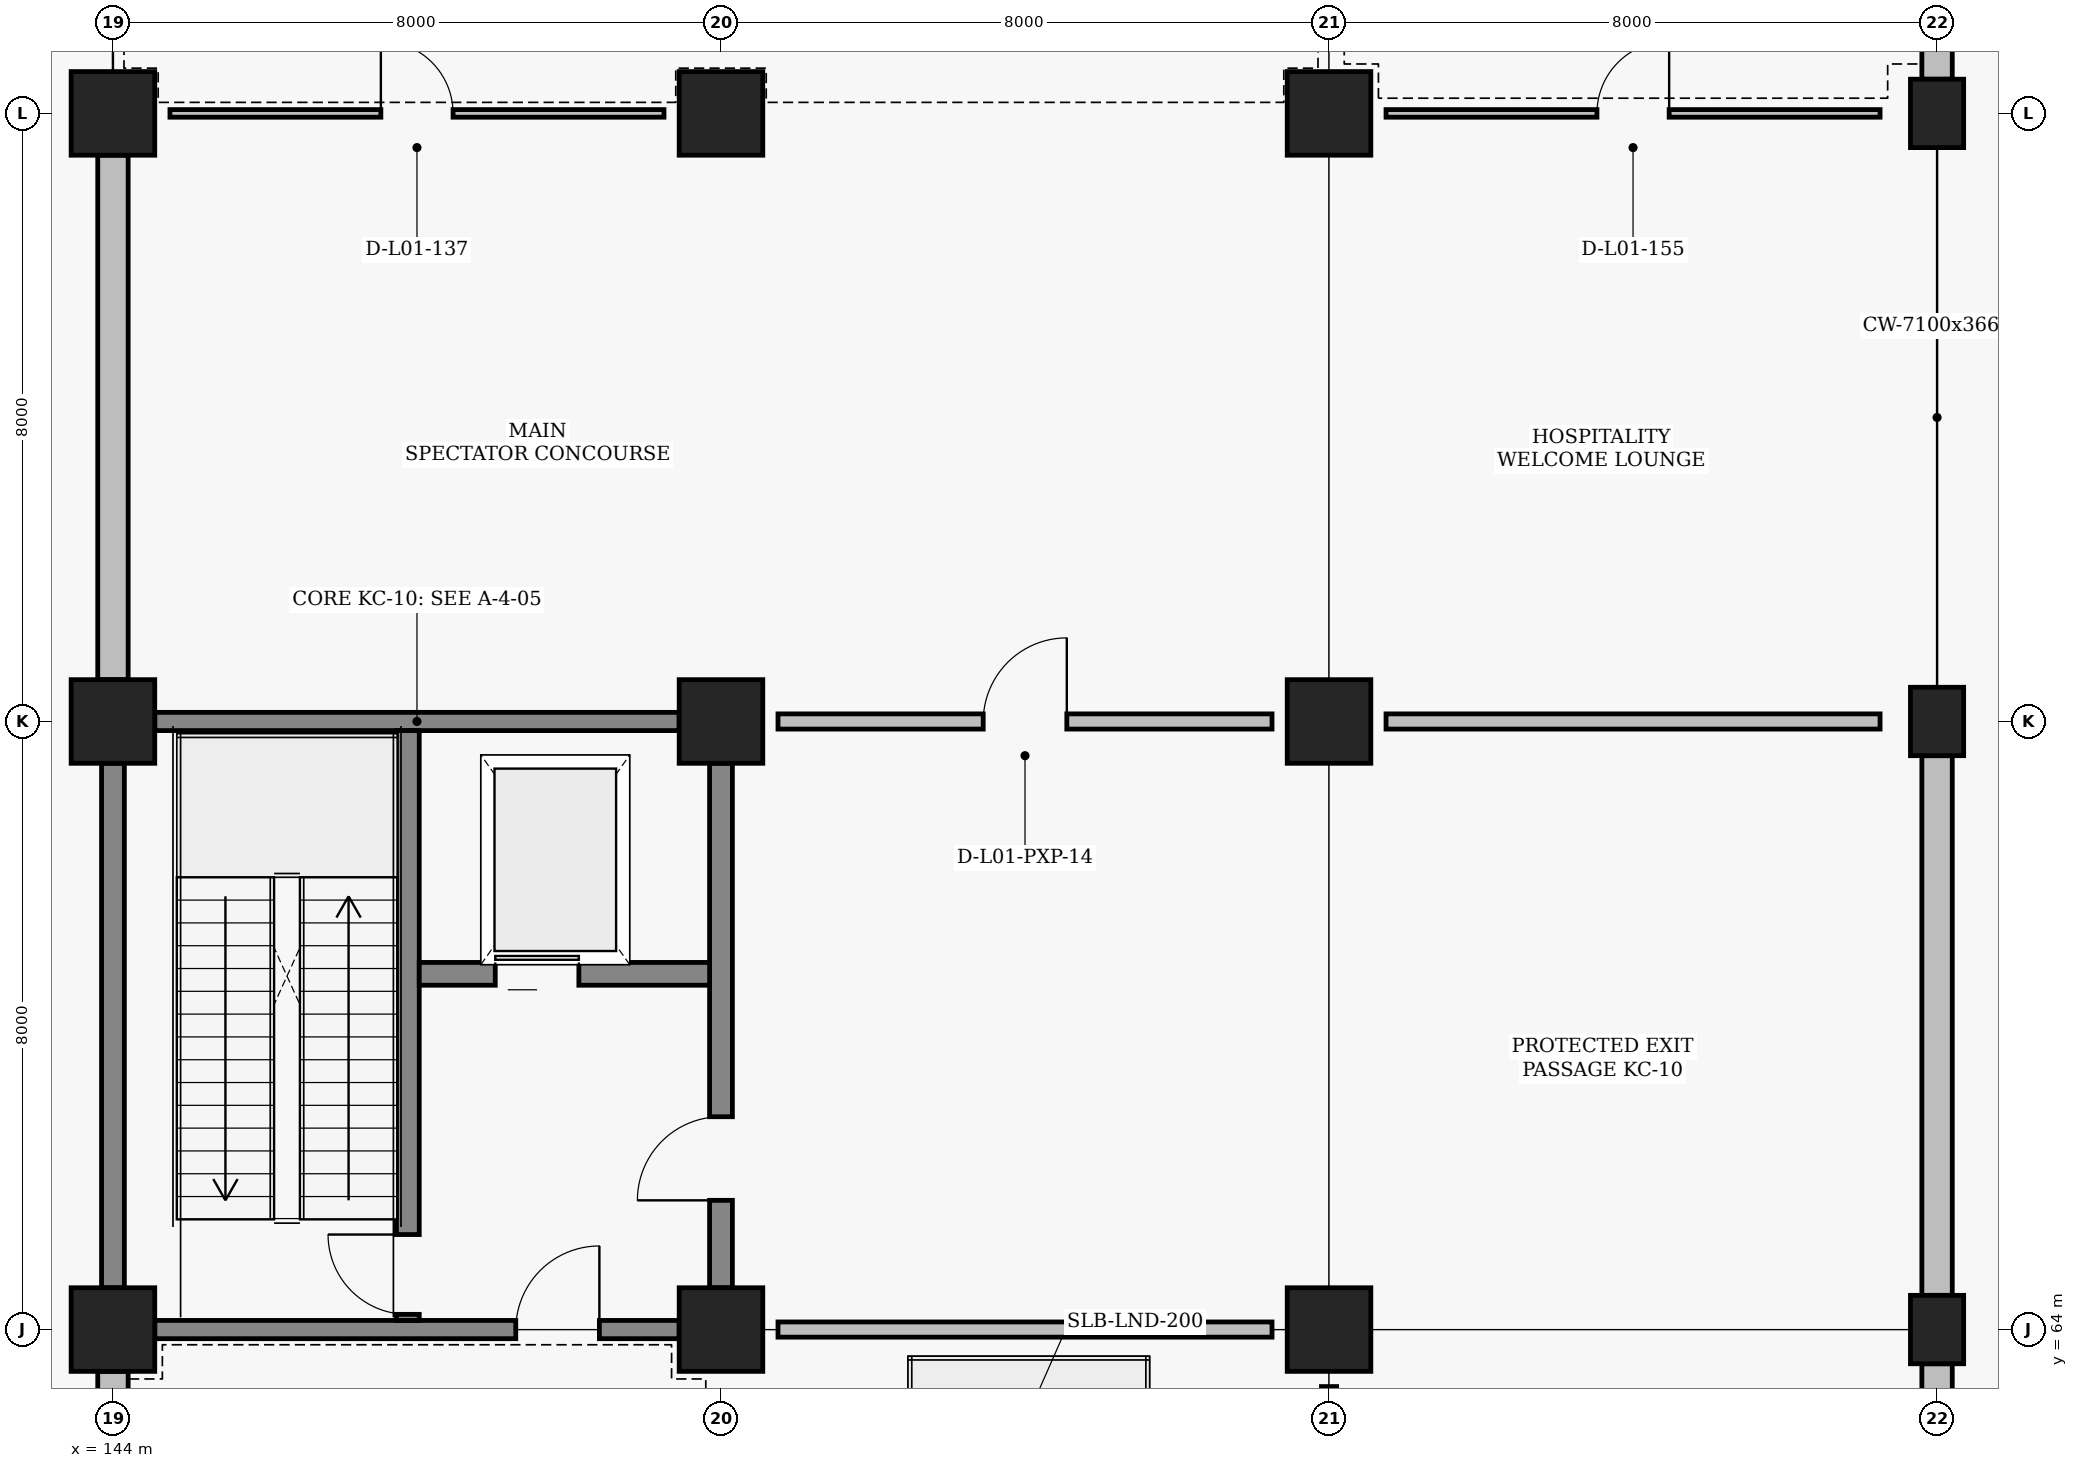
"""IFC4 building model, lengths in metres.
Left out: names, types, materials, properties, quantities, classifications, styles, units other than length and angle.
Written with IfcOpenShell. Run it as: python <this file> out.ifc"""

import sys

from ifc_helpers import new_model, si_unit, direction, frame, frame_2d, origin, origin_2d, place, context, subcontext, project, spatial, rectangle, extrude, element, fill, save


model = new_model("IFC4")
c1 = context("Model", 3, precision=1e-05, world=origin(), true_north=direction((0.0, 1.0)))
c2 = subcontext(c1, "Body", "Model", "MODEL_VIEW")
j1 = project(units=[si_unit("LENGTHUNIT", "METRE"), si_unit("PLANEANGLEUNIT", "RADIAN")], contexts=[c1])
p1 = place(None, origin())
s1 = spatial("IfcSite", under=j1, at=p1, CompositionType="ELEMENT")
p2 = place(p1, origin())
s2 = spatial("IfcBuilding", under=s1, at=p2, CompositionType="ELEMENT")
p3 = place(p2, origin())
s3 = spatial("IfcBuildingStorey", under=s2, at=p3, CompositionType="ELEMENT", Elevation=0.0)
for number, where, z_axis, x_axis in (
    (1, (144.0, 64.0, 0.0), (0.0, 0.0, 1.0), (1.0, 0.0, 0.0)),
    (2, (144.0, 72.0, 0.0), (0.0, 0.0, 1.0), (1.0, 0.0, 0.0)),
    (3, (144.0, 80.0, 0.0), (0.0, 0.0, 1.0), (1.0, 0.0, 0.0)),
    (4, (152.0, 64.0, 0.0), (0.0, 0.0, 1.0), (1.0, 0.0, 0.0)),
    (5, (152.0, 72.0, 0.0), (0.0, 0.0, 1.0), (1.0, 0.0, 0.0)),
    (6, (152.0, 80.0, 0.0), (0.0, 0.0, 1.0), (1.0, 0.0, 0.0)),
    (7, (160.0, 64.0, 0.0), (0.0, 0.0, 1.0), (1.0, 0.0, 0.0)),
    (8, (160.0, 72.0, 0.0), (0.0, 0.0, 1.0), (1.0, 0.0, 0.0)),
    (9, (160.0, 80.0, 0.0), (0.0, 0.0, 1.0), (1.0, 0.0, 0.0)),
):
    element("IfcColumn", number, at=place(p3, frame(where, z_axis=z_axis, x_axis=x_axis)), inside=s3, PredefinedType="COLUMN", context=c2, shape_type="SweptSolid", body=[
        extrude(rectangle(XDim=1.1, YDim=1.1, at=origin_2d()), origin(), (0.0, 0.0, 1.0), 4.8),
    ])
for number, where, z_axis, x_axis in (
    (10, (168.0, 64.0, 0.0), (0.0, 0.0, 1.0), (1.0, 0.0, 0.0)),
    (11, (168.0, 72.0, 0.0), (0.0, 0.0, 1.0), (1.0, 0.0, 0.0)),
    (12, (168.0, 80.0, 0.0), (0.0, 0.0, 1.0), (1.0, 0.0, 0.0)),
):
    element("IfcColumn", number, at=place(p3, frame(where, z_axis=z_axis, x_axis=x_axis)), inside=s3, PredefinedType="COLUMN", context=c2, shape_type="SweptSolid", body=[
        extrude(rectangle(XDim=0.7, YDim=0.9, at=origin_2d()), origin(), (0.0, 0.0, 1.0), 4.8),
    ])
p4 = place(p3, frame((144.0, 56.55, 0.0), z_axis=(0.0, 0.0, 1.0), x_axis=(0.0, 1.0, 0.0)))
e13 = element("IfcWall", 13, at=p4, inside=s3, PredefinedType="SOLIDWALL", context=c2, shape_type="SweptSolid", body=[
    extrude(rectangle(XDim=6.9, YDim=0.4, at=frame_2d((3.45, 0.0))), origin(), (0.0, 0.0, 1.0), 3.66),
])
p5 = place(p3, frame((144.0, 72.55, 0.0), z_axis=(0.0, 0.0, 1.0), x_axis=(0.0, 1.0, 0.0)))
e14 = element("IfcWall", 14, at=p5, inside=s3, PredefinedType="SOLIDWALL", context=c2, shape_type="SweptSolid", body=[
    extrude(rectangle(XDim=6.9, YDim=0.4, at=frame_2d((3.45, 0.0))), origin(), (0.0, 0.0, 1.0), 3.91),
])
p6 = place(p3, frame((168.0, 56.45, 0.0), z_axis=(0.0, 0.0, 1.0), x_axis=(0.0, 1.0, 0.0)))
e15 = element("IfcWall", 15, at=p6, inside=s3, PredefinedType="SOLIDWALL", context=c2, shape_type="SweptSolid", body=[
    extrude(rectangle(XDim=7.1, YDim=0.4, at=frame_2d((3.55, 0.0))), origin(), (0.0, 0.0, 1.0), 3.91),
])
p7 = place(p6, frame((1.825, 0.0, 0.95)))
e16 = element("IfcOpeningElement", 16, at=p7, cuts=e15, PredefinedType="OPENING", context=c2, shape_type="SweptSolid", body=[
    extrude(rectangle(XDim=3.45, YDim=2.2, at=frame_2d((1.725, 1.1))), frame((0.0, 0.21, 0.0), z_axis=(0.0, -1.0, 0.0), x_axis=(1.0, 0.0, 0.0)), (0.0, 0.0, 1.0), 0.42),
])
p8 = place(p3, frame((168.0, 64.45, 0.0), z_axis=(0.0, 0.0, 1.0), x_axis=(0.0, 1.0, 0.0)))
e17 = element("IfcWall", 17, at=p8, inside=s3, PredefinedType="SOLIDWALL", context=c2, shape_type="SweptSolid", body=[
    extrude(rectangle(XDim=7.1, YDim=0.4, at=frame_2d((3.55, 0.0))), origin(), (0.0, 0.0, 1.0), 3.91),
])
p9 = place(p3, frame((168.0, 80.45, 0.0), z_axis=(0.0, 0.0, 1.0), x_axis=(0.0, 1.0, 0.0)))
e18 = element("IfcWall", 18, at=p9, inside=s3, PredefinedType="SOLIDWALL", context=c2, shape_type="SweptSolid", body=[
    extrude(rectangle(XDim=7.1, YDim=0.4, at=frame_2d((3.55, 0.0))), origin(), (0.0, 0.0, 1.0), 3.66),
])
p10 = place(p3, frame((144.55, 64.0, 0.0), z_axis=(0.0, 0.0, 1.0), x_axis=(1.0, 0.0, 0.0)))
e19 = element("IfcWall", 19, at=p10, inside=s3, PredefinedType="SHEAR", context=c2, shape_type="SweptSolid", body=[
    extrude(rectangle(XDim=6.9, YDim=0.24, at=frame_2d((3.45, 0.0))), origin(), (0.0, 0.0, 1.0), 3.81),
])
p11 = place(p10, frame((4.75, 0.0, 0.0)))
e20 = element("IfcOpeningElement", 20, at=p11, cuts=e19, PredefinedType="OPENING", context=c2, shape_type="SweptSolid", body=[
    extrude(rectangle(XDim=1.1, YDim=2.2, at=frame_2d((0.55, 1.1))), frame((0.0, 0.13, 0.0), z_axis=(0.0, -1.0, 0.0), x_axis=(1.0, 0.0, 0.0)), (0.0, 0.0, 1.0), 0.26),
])
p12 = place(p3, frame((144.55, 72.0, 0.0), z_axis=(0.0, 0.0, 1.0), x_axis=(1.0, 0.0, 0.0)))
e21 = element("IfcWall", 21, at=p12, inside=s3, PredefinedType="SHEAR", context=c2, shape_type="SweptSolid", body=[
    extrude(rectangle(XDim=6.9, YDim=0.24, at=frame_2d((3.45, 0.0))), origin(), (0.0, 0.0, 1.0), 3.81),
])
p13 = place(p3, frame((144.0, 64.55, 0.0), z_axis=(0.0, 0.0, 1.0), x_axis=(0.0, 1.0, 0.0)))
e22 = element("IfcWall", 22, at=p13, inside=s3, PredefinedType="SHEAR", context=c2, shape_type="SweptSolid", body=[
    extrude(rectangle(XDim=6.9, YDim=0.3, at=frame_2d((3.45, 0.0))), origin(), (0.0, 0.0, 1.0), 3.91),
])
p14 = place(p3, frame((152.0, 64.55, 0.0), z_axis=(0.0, 0.0, 1.0), x_axis=(0.0, 1.0, 0.0)))
e23 = element("IfcWall", 23, at=p14, inside=s3, PredefinedType="SHEAR", context=c2, shape_type="SweptSolid", body=[
    extrude(rectangle(XDim=6.9, YDim=0.3, at=frame_2d((3.45, 0.0))), origin(), (0.0, 0.0, 1.0), 3.81),
])
p15 = place(p14, frame((1.15, 0.0, 0.0)))
e24 = element("IfcOpeningElement", 24, at=p15, cuts=e23, PredefinedType="OPENING", context=c2, shape_type="SweptSolid", body=[
    extrude(rectangle(XDim=1.1, YDim=2.2, at=frame_2d((0.55, 1.1))), frame((0.0, 0.16, 0.0), z_axis=(0.0, -1.0, 0.0), x_axis=(1.0, 0.0, 0.0)), (0.0, 0.0, 1.0), 0.32),
])
p16 = place(p3, frame((147.88, 64.12, 0.0), z_axis=(0.0, 0.0, 1.0), x_axis=(0.0, 1.0, 0.0)))
e25 = element("IfcWall", 25, at=p16, inside=s3, PredefinedType="SHEAR", context=c2, shape_type="SweptSolid", body=[
    extrude(rectangle(XDim=7.76, YDim=0.3, at=frame_2d((3.88, 0.0))), origin(), (0.0, 0.0, 1.0), 4.01),
])
p17 = place(p16, frame((0.08, 0.0, 0.0)))
e26 = element("IfcOpeningElement", 26, at=p17, cuts=e25, PredefinedType="OPENING", context=c2, shape_type="SweptSolid", body=[
    extrude(rectangle(XDim=1.05, YDim=2.15, at=frame_2d((0.525, 1.075))), frame((0.0, 0.16, 0.0), z_axis=(0.0, -1.0, 0.0), x_axis=(1.0, 0.0, 0.0)), (0.0, 0.0, 1.0), 0.32),
])
p18 = place(p3, frame((148.03, 68.68, 0.0), z_axis=(0.0, 0.0, 1.0), x_axis=(1.0, 0.0, 0.0)))
e27 = element("IfcWall", 27, at=p18, inside=s3, PredefinedType="SHEAR", context=c2, shape_type="SweptSolid", body=[
    extrude(rectangle(XDim=3.82, YDim=0.3, at=frame_2d((1.91, 0.0))), origin(), (0.0, 0.0, 1.0), 3.81),
])
p19 = place(p18, frame((1.0, 0.0, 0.0)))
e28 = element("IfcOpeningElement", 28, at=p19, cuts=e27, PredefinedType="OPENING", context=c2, shape_type="SweptSolid", body=[
    extrude(rectangle(XDim=1.1, YDim=2.15, at=frame_2d((0.55, 1.075))), frame((0.0, 0.16, 0.0), z_axis=(0.0, -1.0, 0.0), x_axis=(1.0, 0.0, 0.0)), (0.0, 0.0, 1.0), 0.32),
])
p20 = place(p3, frame((152.75, 64.0, 0.0), z_axis=(0.0, 0.0, 1.0), x_axis=(1.0, 0.0, 0.0)))
e29 = element("IfcWall", 29, at=p20, inside=s3, PredefinedType="PARTITIONING", context=c2, shape_type="SweptSolid", body=[
    extrude(rectangle(XDim=6.5, YDim=0.2, at=frame_2d((3.25, 0.0))), origin(), (0.0, 0.0, 1.0), 3.91),
])
p21 = place(p3, frame((152.75, 72.0, 0.0), z_axis=(0.0, 0.0, 1.0), x_axis=(1.0, 0.0, 0.0)))
e30 = element("IfcWall", 30, at=p21, inside=s3, PredefinedType="PARTITIONING", context=c2, shape_type="SweptSolid", body=[
    extrude(rectangle(XDim=6.5, YDim=0.2, at=frame_2d((3.25, 0.0))), origin(), (0.0, 0.0, 1.0), 3.91),
])
p22 = place(p21, frame((2.7, 0.0, 0.0)))
e31 = element("IfcOpeningElement", 31, at=p22, cuts=e30, PredefinedType="OPENING", context=c2, shape_type="SweptSolid", body=[
    extrude(rectangle(XDim=1.1, YDim=2.2, at=frame_2d((0.55, 1.1))), frame((0.0, 0.11, 0.0), z_axis=(0.0, -1.0, 0.0), x_axis=(1.0, 0.0, 0.0)), (0.0, 0.0, 1.0), 0.22),
])
p23 = place(p3, frame((160.0, 56.75, 0.0), z_axis=(0.0, 0.0, 1.0), x_axis=(0.0, 1.0, 0.0)))
e32 = element("IfcWall", 32, at=p23, inside=s3, PredefinedType="PARTITIONING", context=c2, shape_type="SweptSolid", body=[
    extrude(rectangle(XDim=6.5, YDim=0.2, at=frame_2d((3.25, 0.0))), origin(), (0.0, 0.0, 1.0), 3.81),
])
p24 = place(p3, frame((160.75, 72.0, 0.0), z_axis=(0.0, 0.0, 1.0), x_axis=(1.0, 0.0, 0.0)))
e33 = element("IfcWall", 33, at=p24, inside=s3, PredefinedType="PARTITIONING", context=c2, shape_type="SweptSolid", body=[
    extrude(rectangle(XDim=6.5, YDim=0.2, at=frame_2d((3.25, 0.0))), origin(), (0.0, 0.0, 1.0), 3.91),
])
p25 = place(p3, frame((144.75, 80.0, 0.0), z_axis=(0.0, 0.0, 1.0), x_axis=(1.0, 0.0, 0.0)))
e34 = element("IfcWall", 34, at=p25, inside=s3, PredefinedType="PARTITIONING", context=c2, shape_type="SweptSolid", body=[
    extrude(rectangle(XDim=6.5, YDim=0.1, at=frame_2d((3.25, 0.0))), origin(), (0.0, 0.0, 1.0), 3.91),
])
p26 = place(p25, frame((2.775, 0.0, 0.0)))
e35 = element("IfcOpeningElement", 35, at=p26, cuts=e34, PredefinedType="OPENING", context=c2, shape_type="SweptSolid", body=[
    extrude(rectangle(XDim=0.95, YDim=2.1, at=frame_2d((0.475, 1.05))), frame((0.0, 0.06, 0.0), z_axis=(0.0, -1.0, 0.0), x_axis=(1.0, 0.0, 0.0)), (0.0, 0.0, 1.0), 0.12),
])
p27 = place(p3, frame((160.75, 80.0, 0.0), z_axis=(0.0, 0.0, 1.0), x_axis=(1.0, 0.0, 0.0)))
e36 = element("IfcWall", 36, at=p27, inside=s3, PredefinedType="PARTITIONING", context=c2, shape_type="SweptSolid", body=[
    extrude(rectangle(XDim=6.5, YDim=0.1, at=frame_2d((3.25, 0.0))), origin(), (0.0, 0.0, 1.0), 3.66),
])
p28 = place(p27, frame((2.775, 0.0, 0.0)))
e37 = element("IfcOpeningElement", 37, at=p28, cuts=e36, PredefinedType="OPENING", context=c2, shape_type="SweptSolid", body=[
    extrude(rectangle(XDim=0.95, YDim=2.1, at=frame_2d((0.475, 1.05))), frame((0.0, 0.06, 0.0), z_axis=(0.0, -1.0, 0.0), x_axis=(1.0, 0.0, 0.0)), (0.0, 0.0, 1.0), 0.12),
])
p29 = place(p11, origin())
e38 = element("IfcDoor", 38, at=p29, inside=s3, OperationType="SINGLE_SWING_RIGHT", PredefinedType="DOOR", context=c2, shape_type="SweptSolid", body=[
    extrude(rectangle(XDim=1.1, YDim=2.2, at=frame_2d((0.55, 1.1))), frame((0.0, 0.025, 0.0), z_axis=(0.0, -1.0, 0.0), x_axis=(1.0, 0.0, 0.0)), (0.0, 0.0, 1.0), 0.05),
])
fill(e20, e38)
p30 = place(p15, origin())
e39 = element("IfcDoor", 39, at=p30, inside=s3, OperationType="SINGLE_SWING_LEFT", PredefinedType="DOOR", context=c2, shape_type="SweptSolid", body=[
    extrude(rectangle(XDim=1.1, YDim=2.2, at=frame_2d((0.55, 1.1))), frame((0.0, 0.025, 0.0), z_axis=(0.0, -1.0, 0.0), x_axis=(1.0, 0.0, 0.0)), (0.0, 0.0, 1.0), 0.05),
])
fill(e24, e39)
p31 = place(p17, origin())
e40 = element("IfcDoor", 40, at=p31, inside=s3, OperationType="SINGLE_SWING_RIGHT", PredefinedType="DOOR", context=c2, shape_type="SweptSolid", body=[
    extrude(rectangle(XDim=1.05, YDim=2.15, at=frame_2d((0.525, 1.075))), frame((0.0, 0.025, 0.0), z_axis=(0.0, -1.0, 0.0), x_axis=(1.0, 0.0, 0.0)), (0.0, 0.0, 1.0), 0.05),
])
fill(e26, e40)
p32 = place(p19, origin())
e41 = element("IfcDoor", 41, at=p32, inside=s3, OperationType="SLIDING_TO_LEFT", PredefinedType="DOOR", context=c2, shape_type="SweptSolid", body=[
    extrude(rectangle(XDim=1.1, YDim=2.15, at=frame_2d((0.55, 1.075))), frame((0.0, 0.025, 0.0), z_axis=(0.0, -1.0, 0.0), x_axis=(1.0, 0.0, 0.0)), (0.0, 0.0, 1.0), 0.05),
])
fill(e28, e41)
p33 = place(p22, origin())
e42 = element("IfcDoor", 42, at=p33, inside=s3, OperationType="SINGLE_SWING_RIGHT", PredefinedType="DOOR", context=c2, shape_type="SweptSolid", body=[
    extrude(rectangle(XDim=1.1, YDim=2.2, at=frame_2d((0.55, 1.1))), frame((0.0, 0.025, 0.0), z_axis=(0.0, -1.0, 0.0), x_axis=(1.0, 0.0, 0.0)), (0.0, 0.0, 1.0), 0.05),
])
fill(e31, e42)
p34 = place(p26, origin())
e43 = element("IfcDoor", 43, at=p34, inside=s3, OperationType="SINGLE_SWING_LEFT", PredefinedType="DOOR", context=c2, shape_type="SweptSolid", body=[
    extrude(rectangle(XDim=0.95, YDim=2.1, at=frame_2d((0.475, 1.05))), frame((0.0, 0.025, 0.0), z_axis=(0.0, -1.0, 0.0), x_axis=(1.0, 0.0, 0.0)), (0.0, 0.0, 1.0), 0.05),
])
fill(e35, e43)
p35 = place(p28, origin())
e44 = element("IfcDoor", 44, at=p35, inside=s3, OperationType="SINGLE_SWING_RIGHT", PredefinedType="DOOR", context=c2, shape_type="SweptSolid", body=[
    extrude(rectangle(XDim=0.95, YDim=2.1, at=frame_2d((0.475, 1.05))), frame((0.0, 0.025, 0.0), z_axis=(0.0, -1.0, 0.0), x_axis=(1.0, 0.0, 0.0)), (0.0, 0.0, 1.0), 0.05),
])
fill(e37, e44)
save(model, sys.argv[1])
